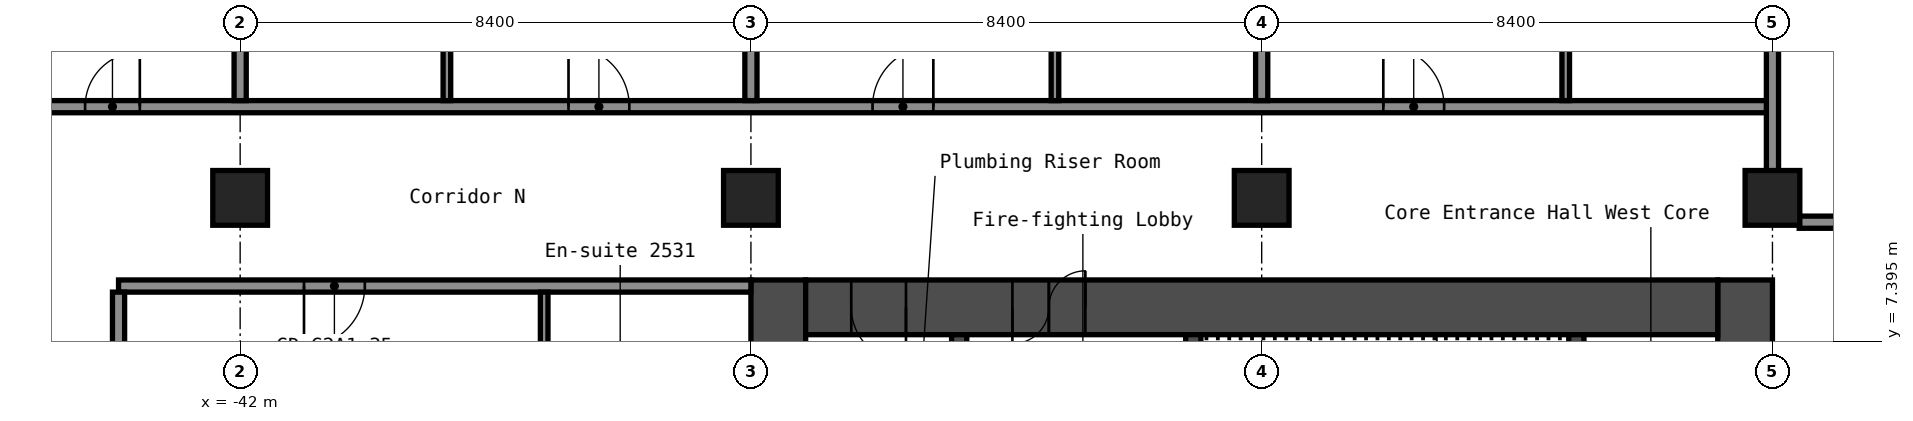
"""IFC4 building model, lengths in metres.
Left out: names, types, materials, properties, quantities, classifications, styles, units other than length and angle.
Written with IfcOpenShell. Run it as: python <this file> out.ifc"""

import sys

from ifc_helpers import new_model, si_unit, direction, frame, frame_2d, origin, origin_2d, place, context, subcontext, project, spatial, rectangle, hollow_rectangle, extrude, element, fill, save


model = new_model("IFC4")
c1 = context("Model", 3, precision=1e-05, world=origin(), true_north=direction((0.0, 1.0)))
c2 = subcontext(c1, "Body", "Model", "MODEL_VIEW")
j1 = project(units=[si_unit("LENGTHUNIT", "METRE"), si_unit("PLANEANGLEUNIT", "RADIAN")], contexts=[c1])
p1 = place(None, origin())
s1 = spatial("IfcSite", under=j1, at=p1, CompositionType="ELEMENT")
p2 = place(p1, origin())
s2 = spatial("IfcBuilding", under=s1, at=p2, CompositionType="ELEMENT")
p3 = place(p2, frame((0.0, 0.0, 91.4)))
s3 = spatial("IfcBuildingStorey", under=s2, at=p3, CompositionType="ELEMENT", Elevation=91.4)
for number, where, z_axis, x_axis in (
    (1, (-42.0, 9.75, 0.0), (0.0, 0.0, 1.0), (1.0, 0.0, 0.0)),
    (2, (-33.6, 9.75, 0.0), (0.0, 0.0, 1.0), (1.0, 0.0, 0.0)),
    (3, (-25.2, 9.75, 0.0), (0.0, 0.0, 1.0), (1.0, 0.0, 0.0)),
    (4, (-16.8, 9.75, 0.0), (0.0, 0.0, 1.0), (1.0, 0.0, 0.0)),
):
    element("IfcColumn", number, at=place(p3, frame(where, z_axis=z_axis, x_axis=x_axis)), inside=s3, PredefinedType="COLUMN", context=c2, shape_type="SweptSolid", body=[
        extrude(hollow_rectangle(XDim=0.9, YDim=0.9, WallThickness=0.036, at=origin_2d()), origin(), (0.0, 0.0, 1.0), 2.8),
    ])
p4 = place(p3, frame((-17.25, -8.4, 0.0), z_axis=(0.0, 0.0, 1.0), x_axis=(0.0, 1.0, 0.0)))
e5 = element("IfcWall", 5, at=p4, inside=s3, PredefinedType="SHEAR", context=c2, shape_type="SweptSolid", body=[
    extrude(rectangle(XDim=16.8, YDim=0.9, at=frame_2d((8.4, 0.0))), origin(), (0.0, 0.0, 1.0), 2.8),
])
p5 = place(p4, frame((7.6, 0.0, 0.0)))
e6 = element("IfcOpeningElement", 6, at=p5, cuts=e5, PredefinedType="OPENING", context=c2, shape_type="SweptSolid", body=[
    extrude(rectangle(XDim=1.2, YDim=2.1, at=frame_2d((0.6, 1.05))), frame((0.0, 0.46, 0.0), z_axis=(0.0, -1.0, 0.0), x_axis=(1.0, 0.0, 0.0)), (0.0, 0.0, 1.0), 0.92),
])
p6 = place(p3, frame((-33.15, -8.4, 0.0), z_axis=(0.0, 0.0, 1.0), x_axis=(0.0, 1.0, 0.0)))
e7 = element("IfcWall", 7, at=p6, inside=s3, PredefinedType="SHEAR", context=c2, shape_type="SweptSolid", body=[
    extrude(rectangle(XDim=16.8, YDim=0.9, at=frame_2d((8.4, 0.0))), origin(), (0.0, 0.0, 1.0), 2.8),
])
p7 = place(p3, frame((-32.7, 7.95, 0.0), z_axis=(0.0, 0.0, 1.0), x_axis=(1.0, 0.0, 0.0)))
e8 = element("IfcWall", 8, at=p7, inside=s3, PredefinedType="SHEAR", context=c2, shape_type="SweptSolid", body=[
    extrude(rectangle(XDim=15.0, YDim=0.9, at=frame_2d((7.5, 0.0))), origin(), (0.0, 0.0, 1.0), 2.8),
])
p8 = place(p7, frame((3.4, 0.0, 0.0)))
e9 = element("IfcOpeningElement", 9, at=p8, cuts=e8, PredefinedType="OPENING", context=c2, shape_type="SweptSolid", body=[
    extrude(rectangle(XDim=1.2, YDim=2.1, at=frame_2d((0.6, 1.05))), frame((0.0, 0.46, 0.0), z_axis=(0.0, -1.0, 0.0), x_axis=(1.0, 0.0, 0.0)), (0.0, 0.0, 1.0), 0.92),
])
p9 = place(p7, frame((0.75, 0.0, 0.0)))
e10 = element("IfcOpeningElement", 10, at=p9, cuts=e8, PredefinedType="OPENING", context=c2, shape_type="SweptSolid", body=[
    extrude(rectangle(XDim=0.9, YDim=2.1, at=frame_2d((0.45, 1.05))), frame((0.0, 0.46, 0.0), z_axis=(0.0, -1.0, 0.0), x_axis=(1.0, 0.0, 0.0)), (0.0, 0.0, 1.0), 0.92),
])
p10 = place(p3, frame((-20.025, 1.2, 0.0), z_axis=(0.0, 0.0, 1.0), x_axis=(0.0, 1.0, 0.0)))
e11 = element("IfcWall", 11, at=p10, inside=s3, PredefinedType="SHEAR", context=c2, shape_type="SweptSolid", body=[
    extrude(rectangle(XDim=6.3, YDim=0.25, at=frame_2d((3.15, 0.0))), origin(), (0.0, 0.0, 1.0), 2.8),
])
p11 = place(p3, frame((-26.325, 3.75, 0.0), z_axis=(0.0, 0.0, 1.0), x_axis=(0.0, 1.0, 0.0)))
e12 = element("IfcWall", 12, at=p11, inside=s3, PredefinedType="SHEAR", context=c2, shape_type="SweptSolid", body=[
    extrude(rectangle(XDim=3.75, YDim=0.25, at=frame_2d((1.875, 0.0))), origin(), (0.0, 0.0, 1.0), 2.8),
])
p12 = place(p11, frame((1.25, 0.0, 0.0)))
e13 = element("IfcOpeningElement", 13, at=p12, cuts=e12, PredefinedType="OPENING", context=c2, shape_type="SweptSolid", body=[
    extrude(rectangle(XDim=1.2, YDim=2.1, at=frame_2d((0.6, 1.05))), frame((0.0, 0.135, 0.0), z_axis=(0.0, -1.0, 0.0), x_axis=(1.0, 0.0, 0.0)), (0.0, 0.0, 1.0), 0.27),
])
p13 = place(p3, frame((-30.175, 1.45, 0.0), z_axis=(0.0, 0.0, 1.0), x_axis=(0.0, 1.0, 0.0)))
e14 = element("IfcWall", 14, at=p13, inside=s3, PredefinedType="SHEAR", context=c2, shape_type="SweptSolid", body=[
    extrude(rectangle(XDim=6.05, YDim=0.25, at=frame_2d((3.025, 0.0))), origin(), (0.0, 0.0, 1.0), 2.8),
])
p14 = place(p13, frame((2.625, 0.0, 0.0)))
e15 = element("IfcOpeningElement", 15, at=p14, cuts=e14, PredefinedType="OPENING", context=c2, shape_type="SweptSolid", body=[
    extrude(rectangle(XDim=1.1, YDim=2.1, at=frame_2d((0.55, 1.05))), frame((0.0, 0.135, 0.0), z_axis=(0.0, -1.0, 0.0), x_axis=(1.0, 0.0, 0.0)), (0.0, 0.0, 1.0), 0.27),
])
p15 = place(p3, frame((-44.0, 8.3, 0.0), z_axis=(0.0, 0.0, 1.0), x_axis=(1.0, 0.0, 0.0)))
e16 = element("IfcWall", 16, at=p15, inside=s3, PredefinedType="PARTITIONING", context=c2, shape_type="SweptSolid", body=[
    extrude(rectangle(XDim=10.4, YDim=0.2, at=frame_2d((5.2, 0.0))), origin(), (0.0, 0.0, 1.0), 2.8),
])
p16 = place(p15, frame((3.05, 0.0, 0.0)))
e17 = element("IfcOpeningElement", 17, at=p16, cuts=e16, PredefinedType="OPENING", context=c2, shape_type="SweptSolid", body=[
    extrude(rectangle(XDim=1.0, YDim=2.1, at=frame_2d((0.5, 1.05))), frame((0.0, 0.11, 0.0), z_axis=(0.0, -1.0, 0.0), x_axis=(1.0, 0.0, 0.0)), (0.0, 0.0, 1.0), 0.22),
])
p17 = place(p3, frame((-16.36, 9.35, 0.0), z_axis=(0.0, 0.0, 1.0), x_axis=(1.0, 0.0, 0.0)))
e18 = element("IfcWall", 18, at=p17, inside=s3, PredefinedType="PARTITIONING", context=c2, shape_type="SweptSolid", body=[
    extrude(rectangle(XDim=32.72, YDim=0.2, at=frame_2d((16.36, 0.0))), origin(), (0.0, 0.0, 1.0), 2.8),
])
p18 = place(p17, frame((1.46, 0.0, 0.0)))
e19 = element("IfcOpeningElement", 19, at=p18, cuts=e18, PredefinedType="OPENING", context=c2, shape_type="SweptSolid", body=[
    extrude(rectangle(XDim=0.9, YDim=2.1, at=frame_2d((0.45, 1.05))), frame((0.0, 0.11, 0.0), z_axis=(0.0, -1.0, 0.0), x_axis=(1.0, 0.0, 0.0)), (0.0, 0.0, 1.0), 0.22),
])
p19 = place(p17, frame((5.66, 0.0, 0.0)))
e20 = element("IfcOpeningElement", 20, at=p19, cuts=e18, PredefinedType="OPENING", context=c2, shape_type="SweptSolid", body=[
    extrude(rectangle(XDim=0.9, YDim=2.1, at=frame_2d((0.45, 1.05))), frame((0.0, 0.11, 0.0), z_axis=(0.0, -1.0, 0.0), x_axis=(1.0, 0.0, 0.0)), (0.0, 0.0, 1.0), 0.22),
])
p20 = place(p17, frame((9.36, 0.0, 0.0)))
e21 = element("IfcOpeningElement", 21, at=p20, cuts=e18, PredefinedType="OPENING", context=c2, shape_type="SweptSolid", body=[
    extrude(rectangle(XDim=0.9, YDim=2.1, at=frame_2d((0.45, 1.05))), frame((0.0, 0.11, 0.0), z_axis=(0.0, -1.0, 0.0), x_axis=(1.0, 0.0, 0.0)), (0.0, 0.0, 1.0), 0.22),
])
p21 = place(p17, frame((13.56, 0.0, 0.0)))
e22 = element("IfcOpeningElement", 22, at=p21, cuts=e18, PredefinedType="OPENING", context=c2, shape_type="SweptSolid", body=[
    extrude(rectangle(XDim=0.9, YDim=2.1, at=frame_2d((0.45, 1.05))), frame((0.0, 0.11, 0.0), z_axis=(0.0, -1.0, 0.0), x_axis=(1.0, 0.0, 0.0)), (0.0, 0.0, 1.0), 0.22),
])
p22 = place(p17, frame((18.6, 0.0, 0.0)))
e23 = element("IfcOpeningElement", 23, at=p22, cuts=e18, PredefinedType="OPENING", context=c2, shape_type="SweptSolid", body=[
    extrude(rectangle(XDim=0.9, YDim=2.1, at=frame_2d((0.45, 1.05))), frame((0.0, 0.11, 0.0), z_axis=(0.0, -1.0, 0.0), x_axis=(1.0, 0.0, 0.0)), (0.0, 0.0, 1.0), 0.22),
])
p23 = place(p17, frame((22.8, 0.0, 0.0)))
e24 = element("IfcOpeningElement", 24, at=p23, cuts=e18, PredefinedType="OPENING", context=c2, shape_type="SweptSolid", body=[
    extrude(rectangle(XDim=0.9, YDim=2.1, at=frame_2d((0.45, 1.05))), frame((0.0, 0.11, 0.0), z_axis=(0.0, -1.0, 0.0), x_axis=(1.0, 0.0, 0.0)), (0.0, 0.0, 1.0), 0.22),
])
p24 = place(p17, frame((26.24, 0.0, 0.0)))
e25 = element("IfcOpeningElement", 25, at=p24, cuts=e18, PredefinedType="OPENING", context=c2, shape_type="SweptSolid", body=[
    extrude(rectangle(XDim=0.9, YDim=2.1, at=frame_2d((0.45, 1.05))), frame((0.0, 0.11, 0.0), z_axis=(0.0, -1.0, 0.0), x_axis=(1.0, 0.0, 0.0)), (0.0, 0.0, 1.0), 0.22),
])
p25 = place(p17, frame((30.44, 0.0, 0.0)))
e26 = element("IfcOpeningElement", 26, at=p25, cuts=e18, PredefinedType="OPENING", context=c2, shape_type="SweptSolid", body=[
    extrude(rectangle(XDim=0.9, YDim=2.1, at=frame_2d((0.45, 1.05))), frame((0.0, 0.11, 0.0), z_axis=(0.0, -1.0, 0.0), x_axis=(1.0, 0.0, 0.0)), (0.0, 0.0, 1.0), 0.22),
])
p26 = place(p3, frame((-46.5, 11.25, 0.0), z_axis=(0.0, 0.0, 1.0), x_axis=(1.0, 0.0, 0.0)))
e27 = element("IfcWall", 27, at=p26, inside=s3, PredefinedType="PARTITIONING", context=c2, shape_type="SweptSolid", body=[
    extrude(rectangle(XDim=29.7, YDim=0.2, at=frame_2d((14.85, 0.0))), origin(), (0.0, 0.0, 1.0), 2.8),
])
p27 = place(p26, frame((1.95, 0.0, 0.0)))
e28 = element("IfcOpeningElement", 28, at=p27, cuts=e27, PredefinedType="OPENING", context=c2, shape_type="SweptSolid", body=[
    extrude(rectangle(XDim=0.9, YDim=2.1, at=frame_2d((0.45, 1.05))), frame((0.0, 0.11, 0.0), z_axis=(0.0, -1.0, 0.0), x_axis=(1.0, 0.0, 0.0)), (0.0, 0.0, 1.0), 0.22),
])
p28 = place(p26, frame((9.9, 0.0, 0.0)))
e29 = element("IfcOpeningElement", 29, at=p28, cuts=e27, PredefinedType="OPENING", context=c2, shape_type="SweptSolid", body=[
    extrude(rectangle(XDim=1.0, YDim=2.1, at=frame_2d((0.5, 1.05))), frame((0.0, 0.11, 0.0), z_axis=(0.0, -1.0, 0.0), x_axis=(1.0, 0.0, 0.0)), (0.0, 0.0, 1.0), 0.22),
])
p29 = place(p26, frame((14.9, 0.0, 0.0)))
e30 = element("IfcOpeningElement", 30, at=p29, cuts=e27, PredefinedType="OPENING", context=c2, shape_type="SweptSolid", body=[
    extrude(rectangle(XDim=1.0, YDim=2.1, at=frame_2d((0.5, 1.05))), frame((0.0, 0.11, 0.0), z_axis=(0.0, -1.0, 0.0), x_axis=(1.0, 0.0, 0.0)), (0.0, 0.0, 1.0), 0.22),
])
p30 = place(p26, frame((23.3, 0.0, 0.0)))
e31 = element("IfcOpeningElement", 31, at=p30, cuts=e27, PredefinedType="OPENING", context=c2, shape_type="SweptSolid", body=[
    extrude(rectangle(XDim=1.0, YDim=2.1, at=frame_2d((0.5, 1.05))), frame((0.0, 0.11, 0.0), z_axis=(0.0, -1.0, 0.0), x_axis=(1.0, 0.0, 0.0)), (0.0, 0.0, 1.0), 0.22),
])
p31 = place(p3, frame((-44.0, -8.2, 0.0), z_axis=(0.0, 0.0, 1.0), x_axis=(0.0, 1.0, 0.0)))
e32 = element("IfcWall", 32, at=p31, inside=s3, PredefinedType="PARTITIONING", context=c2, shape_type="SweptSolid", body=[
    extrude(rectangle(XDim=16.4, YDim=0.2, at=frame_2d((8.2, 0.0))), origin(), (0.0, 0.0, 1.0), 2.8),
])
p32 = place(p3, frame((-42.0, 11.35, 0.0), z_axis=(0.0, 0.0, 1.0), x_axis=(0.0, 1.0, 0.0)))
e33 = element("IfcWall", 33, at=p32, inside=s3, PredefinedType="PARTITIONING", context=c2, shape_type="SweptSolid", body=[
    extrude(rectangle(XDim=12.2, YDim=0.2, at=frame_2d((6.1, 0.0))), origin(), (0.0, 0.0, 1.0), 2.8),
])
p33 = place(p3, frame((-38.6, 11.35, 0.0), z_axis=(0.0, 0.0, 1.0), x_axis=(0.0, 1.0, 0.0)))
e34 = element("IfcWall", 34, at=p33, inside=s3, PredefinedType="PARTITIONING", context=c2, shape_type="SweptSolid", body=[
    extrude(rectangle(XDim=3.3, YDim=0.125, at=frame_2d((1.65, 0.0))), origin(), (0.0, 0.0, 1.0), 2.8),
])
p34 = place(p3, frame((-37.0, 4.9, 0.0), z_axis=(0.0, 0.0, 1.0), x_axis=(0.0, 1.0, 0.0)))
e35 = element("IfcWall", 35, at=p34, inside=s3, PredefinedType="PARTITIONING", context=c2, shape_type="SweptSolid", body=[
    extrude(rectangle(XDim=3.3, YDim=0.125, at=frame_2d((1.65, 0.0))), origin(), (0.0, 0.0, 1.0), 2.8),
])
p35 = place(p3, frame((-33.6, 11.35, 0.0), z_axis=(0.0, 0.0, 1.0), x_axis=(0.0, 1.0, 0.0)))
e36 = element("IfcWall", 36, at=p35, inside=s3, PredefinedType="PARTITIONING", context=c2, shape_type="SweptSolid", body=[
    extrude(rectangle(XDim=12.2, YDim=0.2, at=frame_2d((6.1, 0.0))), origin(), (0.0, 0.0, 1.0), 2.8),
])
p36 = place(p3, frame((-28.6, 11.35, 0.0), z_axis=(0.0, 0.0, 1.0), x_axis=(0.0, 1.0, 0.0)))
e37 = element("IfcWall", 37, at=p36, inside=s3, PredefinedType="PARTITIONING", context=c2, shape_type="SweptSolid", body=[
    extrude(rectangle(XDim=3.3, YDim=0.125, at=frame_2d((1.65, 0.0))), origin(), (0.0, 0.0, 1.0), 2.8),
])
p37 = place(p3, frame((-25.2, 11.35, 0.0), z_axis=(0.0, 0.0, 1.0), x_axis=(0.0, 1.0, 0.0)))
e38 = element("IfcWall", 38, at=p37, inside=s3, PredefinedType="PARTITIONING", context=c2, shape_type="SweptSolid", body=[
    extrude(rectangle(XDim=12.2, YDim=0.2, at=frame_2d((6.1, 0.0))), origin(), (0.0, 0.0, 1.0), 2.8),
])
p38 = place(p3, frame((-20.2, 11.35, 0.0), z_axis=(0.0, 0.0, 1.0), x_axis=(0.0, 1.0, 0.0)))
e39 = element("IfcWall", 39, at=p38, inside=s3, PredefinedType="PARTITIONING", context=c2, shape_type="SweptSolid", body=[
    extrude(rectangle(XDim=3.3, YDim=0.125, at=frame_2d((1.65, 0.0))), origin(), (0.0, 0.0, 1.0), 2.8),
])
p39 = place(p3, frame((-16.8, 10.19, 0.0), z_axis=(0.0, 0.0, 1.0), x_axis=(0.0, 1.0, 0.0)))
e40 = element("IfcWall", 40, at=p39, inside=s3, PredefinedType="PARTITIONING", context=c2, shape_type="SweptSolid", body=[
    extrude(rectangle(XDim=13.36, YDim=0.2, at=frame_2d((6.68, 0.0))), origin(), (0.0, 0.0, 1.0), 2.8),
])
p40 = place(p8, origin())
e41 = element("IfcDoor", 41, at=p40, inside=s3, OperationType="DOUBLE_DOOR_SINGLE_SWING", PredefinedType="DOOR", context=c2, shape_type="SweptSolid", body=[
    extrude(rectangle(XDim=1.2, YDim=2.1, at=frame_2d((0.6, 1.05))), frame((0.0, 0.025, 0.0), z_axis=(0.0, -1.0, 0.0), x_axis=(1.0, 0.0, 0.0)), (0.0, 0.0, 1.0), 0.05),
])
fill(e9, e41)
p41 = place(p9, origin())
e42 = element("IfcDoor", 42, at=p41, inside=s3, OperationType="SINGLE_SWING_RIGHT", PredefinedType="DOOR", context=c2, shape_type="SweptSolid", body=[
    extrude(rectangle(XDim=0.9, YDim=2.1, at=frame_2d((0.45, 1.05))), frame((0.0, 0.025, 0.0), z_axis=(0.0, -1.0, 0.0), x_axis=(1.0, 0.0, 0.0)), (0.0, 0.0, 1.0), 0.05),
])
fill(e10, e42)
p42 = place(p16, origin())
e43 = element("IfcDoor", 43, at=p42, inside=s3, OperationType="SINGLE_SWING_LEFT", PredefinedType="DOOR", context=c2, shape_type="SweptSolid", body=[
    extrude(rectangle(XDim=1.0, YDim=2.1, at=frame_2d((0.5, 1.05))), frame((0.0, 0.025, 0.0), z_axis=(0.0, -1.0, 0.0), x_axis=(1.0, 0.0, 0.0)), (0.0, 0.0, 1.0), 0.05),
])
fill(e17, e43)
p43 = place(p27, origin())
e44 = element("IfcDoor", 44, at=p43, inside=s3, OperationType="SINGLE_SWING_LEFT", PredefinedType="DOOR", context=c2, shape_type="SweptSolid", body=[
    extrude(rectangle(XDim=0.9, YDim=2.1, at=frame_2d((0.45, 1.05))), frame((0.0, 0.025, 0.0), z_axis=(0.0, -1.0, 0.0), x_axis=(1.0, 0.0, 0.0)), (0.0, 0.0, 1.0), 0.05),
])
fill(e28, e44)
p44 = place(p28, origin())
e45 = element("IfcDoor", 45, at=p44, inside=s3, OperationType="SINGLE_SWING_RIGHT", PredefinedType="DOOR", context=c2, shape_type="SweptSolid", body=[
    extrude(rectangle(XDim=1.0, YDim=2.1, at=frame_2d((0.5, 1.05))), frame((0.0, 0.025, 0.0), z_axis=(0.0, -1.0, 0.0), x_axis=(1.0, 0.0, 0.0)), (0.0, 0.0, 1.0), 0.05),
])
fill(e29, e45)
p45 = place(p29, origin())
e46 = element("IfcDoor", 46, at=p45, inside=s3, OperationType="SINGLE_SWING_LEFT", PredefinedType="DOOR", context=c2, shape_type="SweptSolid", body=[
    extrude(rectangle(XDim=1.0, YDim=2.1, at=frame_2d((0.5, 1.05))), frame((0.0, 0.025, 0.0), z_axis=(0.0, -1.0, 0.0), x_axis=(1.0, 0.0, 0.0)), (0.0, 0.0, 1.0), 0.05),
])
fill(e30, e46)
p46 = place(p30, origin())
e47 = element("IfcDoor", 47, at=p46, inside=s3, OperationType="SINGLE_SWING_RIGHT", PredefinedType="DOOR", context=c2, shape_type="SweptSolid", body=[
    extrude(rectangle(XDim=1.0, YDim=2.1, at=frame_2d((0.5, 1.05))), frame((0.0, 0.025, 0.0), z_axis=(0.0, -1.0, 0.0), x_axis=(1.0, 0.0, 0.0)), (0.0, 0.0, 1.0), 0.05),
])
fill(e31, e47)
save(model, sys.argv[1])
